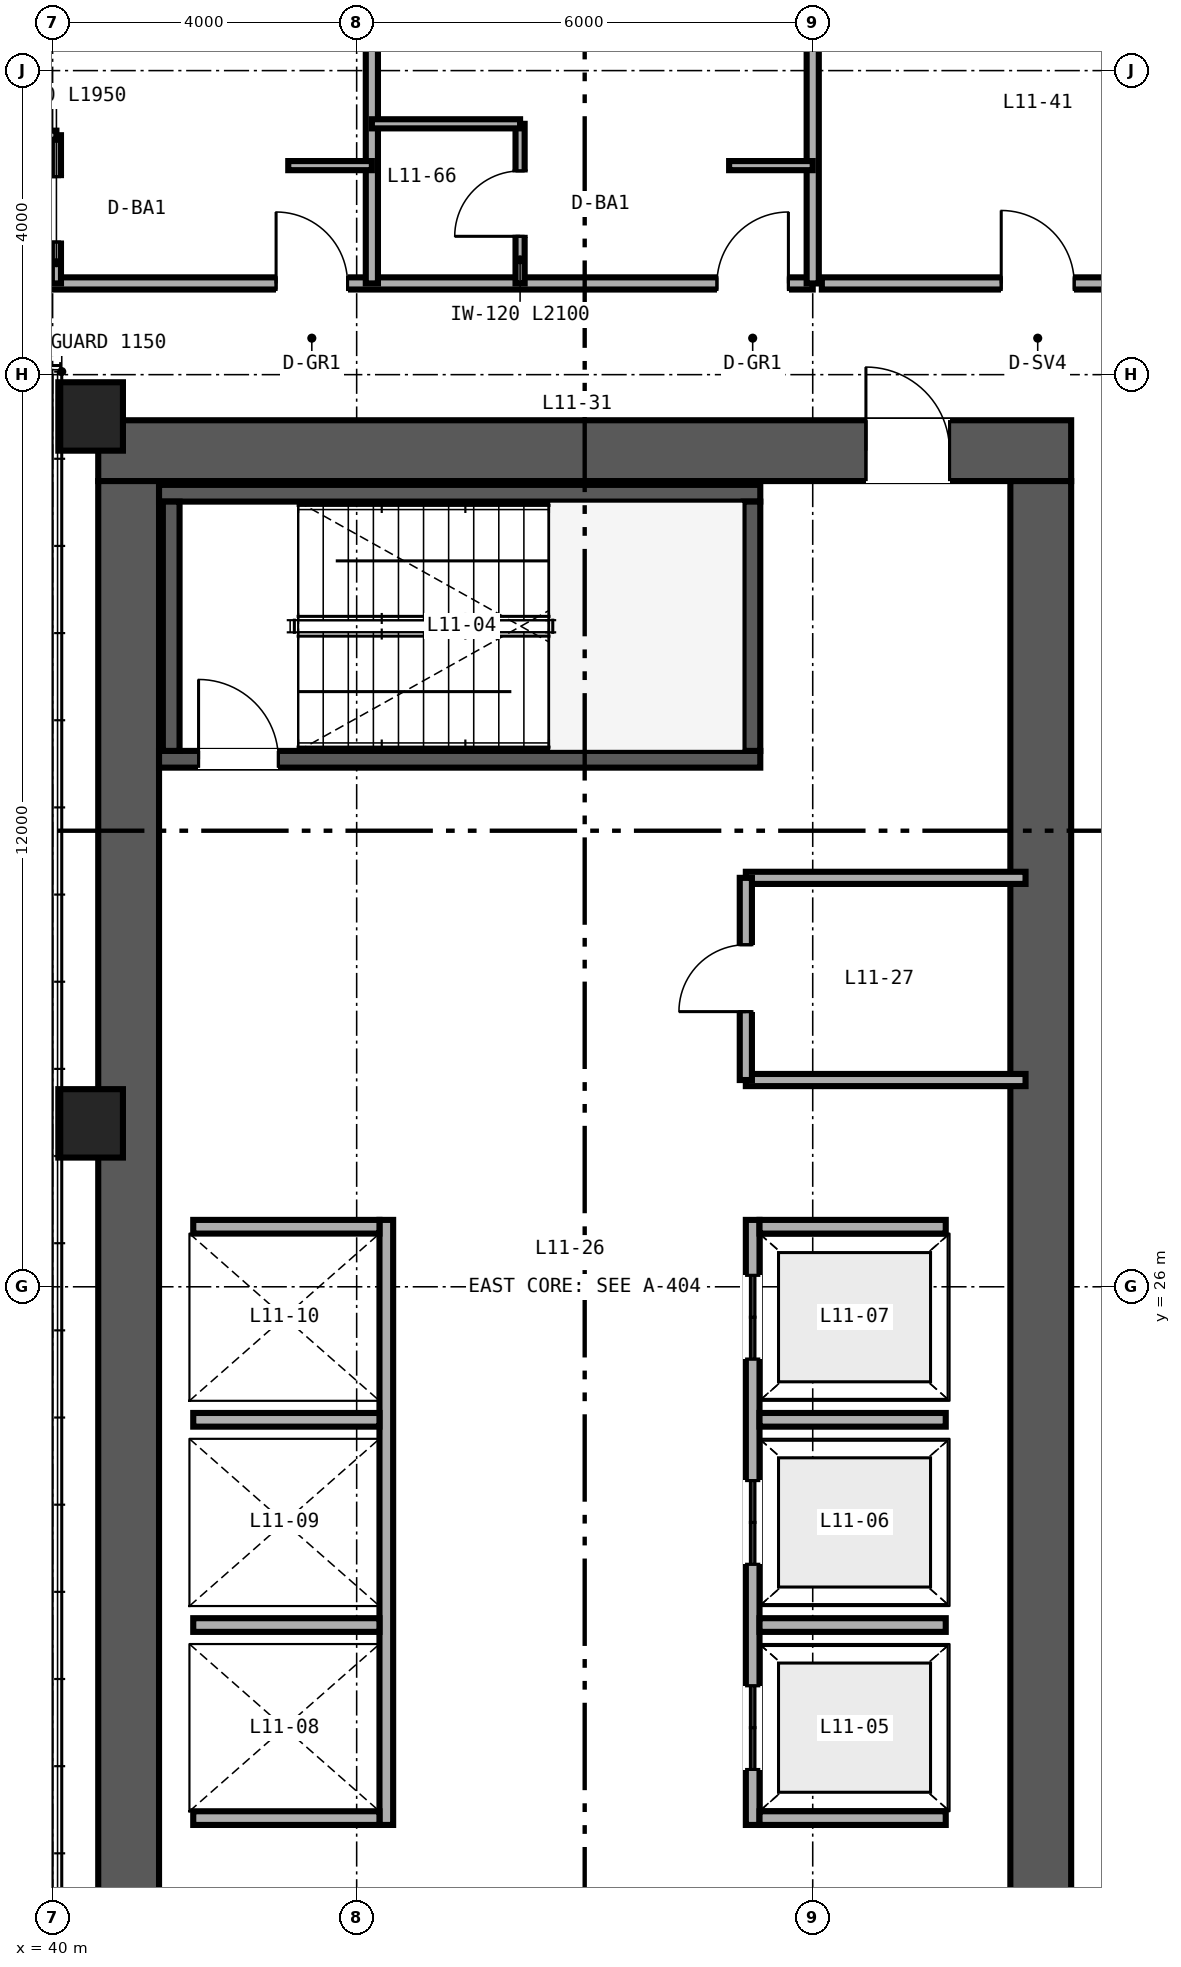
"""IFC4 building model, lengths in metres.
Left out: names, types, materials, properties, quantities, classifications, styles, units other than length and angle.
Written with IfcOpenShell. Run it as: python <this file> out.ifc"""

import sys

from ifc_helpers import new_model, si_unit, direction, frame, frame_2d, origin, origin_2d, place, context, subcontext, project, spatial, rectangle, hollow_rectangle, extrude, source, transform, mapped, element, fill, save


model = new_model("IFC4")
c1 = context("Model", 3, precision=1e-05, world=origin(), true_north=direction((0.0, 1.0)))
c2 = subcontext(c1, "Body", "Model", "MODEL_VIEW")
j1 = project(units=[si_unit("LENGTHUNIT", "METRE"), si_unit("PLANEANGLEUNIT", "RADIAN")], contexts=[c1])
p1 = place(None, origin())
s1 = spatial("IfcSite", under=j1, at=p1, CompositionType="ELEMENT")
p2 = place(p1, origin())
s2 = spatial("IfcBuilding", under=s1, at=p2, CompositionType="ELEMENT")
p3 = place(p2, frame((0.0, 0.0, 49.2)))
s3 = spatial("IfcBuildingStorey", under=s2, at=p3, CompositionType="ELEMENT", Elevation=49.2)
p4 = place(p3, frame((40.6, 37.0, 0.0), z_axis=(0.0, 0.0, 1.0), x_axis=(1.0, 0.0, 0.0)))
e1 = element("IfcWall", 1, at=p4, inside=s3, PredefinedType="SHEAR", context=c2, shape_type="SweptSolid", body=[
    extrude(rectangle(XDim=12.8, YDim=0.8, at=frame_2d((6.4, 0.0))), origin(), (0.0, 0.0, 1.0), 3.35),
])
p5 = place(p4, frame((10.1, 0.0, 0.0)))
e2 = element("IfcOpeningElement", 2, at=p5, cuts=e1, PredefinedType="OPENING", context=c2, shape_type="SweptSolid", body=[
    extrude(rectangle(XDim=1.1, YDim=2.15, at=frame_2d((0.55, 1.075))), frame((0.0, 0.41, 0.0), z_axis=(0.0, -1.0, 0.0), x_axis=(1.0, 0.0, 0.0)), (0.0, 0.0, 1.0), 0.82),
])
for number, where, z_axis, x_axis in (
    (3, (41.0, 15.4, 0.0), (0.0, 0.0, 1.0), (0.0, 1.0, 0.0)),
    (4, (53.0, 15.4, 0.0), (0.0, 0.0, 1.0), (0.0, 1.0, 0.0)),
):
    element("IfcWall", number, at=place(p3, frame(where, z_axis=z_axis, x_axis=x_axis)), inside=s3, PredefinedType="SHEAR", context=c2, shape_type="SweptSolid", body=[
        extrude(rectangle(XDim=21.2, YDim=0.8, at=frame_2d((10.6, 0.0))), origin(), (0.0, 0.0, 1.0), 3.35),
    ])
p6 = place(p3, frame((41.4, 32.94, 0.0), z_axis=(0.0, 0.0, 1.0), x_axis=(1.0, 0.0, 0.0)))
e5 = element("IfcWall", 5, at=p6, inside=s3, PredefinedType="SHEAR", context=c2, shape_type="SweptSolid", body=[
    extrude(rectangle(XDim=7.91, YDim=0.22, at=frame_2d((3.955, 0.0))), origin(), (0.0, 0.0, 1.0), 3.4),
])
p7 = place(p6, frame((0.52, 0.0, 0.0)))
e6 = element("IfcOpeningElement", 6, at=p7, cuts=e5, PredefinedType="OPENING", context=c2, shape_type="SweptSolid", body=[
    extrude(rectangle(XDim=1.05, YDim=2.15, at=frame_2d((0.525, 1.075))), frame((0.0, 0.12, 0.0), z_axis=(0.0, -1.0, 0.0), x_axis=(1.0, 0.0, 0.0)), (0.0, 0.0, 1.0), 0.24),
])
p8 = place(p3, frame((41.4, 36.44, 0.0), z_axis=(0.0, 0.0, 1.0), x_axis=(1.0, 0.0, 0.0)))
e7 = element("IfcWall", 7, at=p8, inside=s3, PredefinedType="SHEAR", context=c2, shape_type="SweptSolid", body=[
    extrude(rectangle(XDim=7.91, YDim=0.22, at=frame_2d((3.955, 0.0))), origin(), (0.0, 0.0, 1.0), 3.4),
])
for number, where, z_axis, x_axis in (
    (8, (41.56, 33.05, 0.0), (0.0, 0.0, 1.0), (0.0, 1.0, 0.0)),
    (9, (49.2, 33.05, 0.0), (0.0, 0.0, 1.0), (0.0, 1.0, 0.0)),
):
    element("IfcWall", number, at=place(p3, frame(where, z_axis=z_axis, x_axis=x_axis)), inside=s3, PredefinedType="SHEAR", context=c2, shape_type="SweptSolid", body=[
        extrude(rectangle(XDim=3.28, YDim=0.22, at=frame_2d((1.64, 0.0))), origin(), (0.0, 0.0, 1.0), 3.4),
    ])
m1 = source(origin(), c2, "Body", "SweptSolid", [
    extrude(hollow_rectangle(XDim=0.85, YDim=0.9, WallThickness=0.04, at=origin_2d()), origin(), (0.0, 0.0, 1.0), 3.35),
])
for number, where, z_axis, x_axis in (
    (10, (40.5, 28.15, 0.0), (0.0, 0.0, 1.0), (1.0, 0.0, 0.0)),
    (11, (40.5, 37.45, 0.0), (0.0, 0.0, 1.0), (1.0, 0.0, 0.0)),
):
    element("IfcColumn", number, at=place(p3, frame(where, z_axis=z_axis, x_axis=x_axis)), inside=s3, PredefinedType="COLUMN", context=c2, shape_type="MappedRepresentation", body=[
        mapped(m1, transform((0.0, 0.0, 0.0), scale=1.0)),
    ])
p9 = place(p3, frame((49.21, 18.92, 0.0), z_axis=(0.0, 0.0, 1.0), x_axis=(0.0, 1.0, 0.0)))
e12 = element("IfcWall", 12, at=p9, inside=s3, PredefinedType="SOLIDWALL", context=c2, shape_type="SweptSolid", body=[
    extrude(rectangle(XDim=7.96, YDim=0.18, at=frame_2d((3.98, 0.0))), origin(), (0.0, 0.0, 1.0), 3.35),
])
p10 = place(p9, frame((0.73, 0.0, 0.0)))
e13 = element("IfcOpeningElement", 13, at=p10, cuts=e12, PredefinedType="OPENING", context=c2, shape_type="SweptSolid", body=[
    extrude(rectangle(XDim=1.1, YDim=2.2, at=frame_2d((0.55, 1.1))), frame((0.0, 0.1, 0.0), z_axis=(0.0, -1.0, 0.0), x_axis=(1.0, 0.0, 0.0)), (0.0, 0.0, 1.0), 0.2),
])
p11 = place(p9, frame((3.43, 0.0, 0.0)))
e14 = element("IfcOpeningElement", 14, at=p11, cuts=e12, PredefinedType="OPENING", context=c2, shape_type="SweptSolid", body=[
    extrude(rectangle(XDim=1.1, YDim=2.2, at=frame_2d((0.55, 1.1))), frame((0.0, 0.1, 0.0), z_axis=(0.0, -1.0, 0.0), x_axis=(1.0, 0.0, 0.0)), (0.0, 0.0, 1.0), 0.2),
])
p12 = place(p9, frame((6.13, 0.0, 0.0)))
e15 = element("IfcOpeningElement", 15, at=p12, cuts=e12, PredefinedType="OPENING", context=c2, shape_type="SweptSolid", body=[
    extrude(rectangle(XDim=1.1, YDim=2.2, at=frame_2d((0.55, 1.1))), frame((0.0, 0.1, 0.0), z_axis=(0.0, -1.0, 0.0), x_axis=(1.0, 0.0, 0.0)), (0.0, 0.0, 1.0), 0.2),
])
for number, where, z_axis, x_axis in (
    (16, (49.3, 19.01, 0.0), (0.0, 0.0, 1.0), (1.0, 0.0, 0.0)),
    (17, (49.3, 26.79, 0.0), (0.0, 0.0, 1.0), (1.0, 0.0, 0.0)),
    (18, (49.3, 21.55, 0.0), (0.0, 0.0, 1.0), (1.0, 0.0, 0.0)),
    (19, (49.3, 24.25, 0.0), (0.0, 0.0, 1.0), (1.0, 0.0, 0.0)),
):
    element("IfcWall", number, at=place(p3, frame(where, z_axis=z_axis, x_axis=x_axis)), inside=s3, PredefinedType="SOLIDWALL", context=c2, shape_type="SweptSolid", body=[
        extrude(rectangle(XDim=2.45, YDim=0.18, at=frame_2d((1.225, 0.0))), origin(), (0.0, 0.0, 1.0), 3.35),
    ])
p13 = place(p3, frame((44.39, 18.92, 0.0), z_axis=(0.0, 0.0, 1.0), x_axis=(0.0, 1.0, 0.0)))
e20 = element("IfcWall", 20, at=p13, inside=s3, PredefinedType="SOLIDWALL", context=c2, shape_type="SweptSolid", body=[
    extrude(rectangle(XDim=7.96, YDim=0.18, at=frame_2d((3.98, 0.0))), origin(), (0.0, 0.0, 1.0), 3.35),
])
for number, where, z_axis, x_axis in (
    (21, (41.85, 19.01, 0.0), (0.0, 0.0, 1.0), (1.0, 0.0, 0.0)),
    (22, (41.85, 26.79, 0.0), (0.0, 0.0, 1.0), (1.0, 0.0, 0.0)),
    (23, (41.85, 21.55, 0.0), (0.0, 0.0, 1.0), (1.0, 0.0, 0.0)),
    (24, (41.85, 24.25, 0.0), (0.0, 0.0, 1.0), (1.0, 0.0, 0.0)),
):
    element("IfcWall", number, at=place(p3, frame(where, z_axis=z_axis, x_axis=x_axis)), inside=s3, PredefinedType="SOLIDWALL", context=c2, shape_type="SweptSolid", body=[
        extrude(rectangle(XDim=2.45, YDim=0.18, at=frame_2d((1.225, 0.0))), origin(), (0.0, 0.0, 1.0), 3.35),
    ])
p14 = place(p3, frame((49.12, 28.72, 0.0), z_axis=(0.0, 0.0, 1.0), x_axis=(1.0, 0.0, 0.0)))
e25 = element("IfcWall", 25, at=p14, inside=s3, PredefinedType="PARTITIONING", context=c2, shape_type="SweptSolid", body=[
    extrude(rectangle(XDim=3.68, YDim=0.16, at=frame_2d((1.84, 0.0))), origin(), (0.0, 0.0, 1.0), 3.35),
])
p15 = place(p3, frame((49.12, 31.38, 0.0), z_axis=(0.0, 0.0, 1.0), x_axis=(1.0, 0.0, 0.0)))
e26 = element("IfcWall", 26, at=p15, inside=s3, PredefinedType="PARTITIONING", context=c2, shape_type="SweptSolid", body=[
    extrude(rectangle(XDim=3.68, YDim=0.16, at=frame_2d((1.84, 0.0))), origin(), (0.0, 0.0, 1.0), 2.36),
])
p16 = place(p3, frame((49.12, 28.72, 0.0), z_axis=(0.0, 0.0, 1.0), x_axis=(0.0, 1.0, 0.0)))
e27 = element("IfcWall", 27, at=p16, inside=s3, PredefinedType="PARTITIONING", context=c2, shape_type="SweptSolid", body=[
    extrude(rectangle(XDim=2.66, YDim=0.16, at=frame_2d((1.33, 0.0))), origin(), (0.0, 0.0, 1.0), 2.36),
])
p17 = place(p16, frame((0.9, 0.0, 0.0)))
e28 = element("IfcOpeningElement", 28, at=p17, cuts=e27, PredefinedType="OPENING", context=c2, shape_type="SweptSolid", body=[
    extrude(rectangle(XDim=0.88, YDim=2.15, at=frame_2d((0.44, 1.075))), frame((0.0, 0.09, 0.0), z_axis=(0.0, -1.0, 0.0), x_axis=(1.0, 0.0, 0.0)), (0.0, 0.0, 1.0), 0.18),
])
p18 = place(p3, frame((50.12, 39.2, 0.0), z_axis=(0.0, 0.0, 1.0), x_axis=(1.0, 0.0, 0.0)))
e29 = element("IfcWall", 29, at=p18, inside=s3, PredefinedType="PARTITIONING", context=c2, shape_type="SweptSolid", body=[
    extrude(rectangle(XDim=5.68, YDim=0.16, at=frame_2d((2.84, 0.0))), origin(), (0.0, 0.0, 1.0), 3.35),
])
p19 = place(p18, frame((2.36, 0.0, 0.0)))
e30 = element("IfcOpeningElement", 30, at=p19, cuts=e29, PredefinedType="OPENING", context=c2, shape_type="SweptSolid", body=[
    extrude(rectangle(XDim=0.96, YDim=2.15, at=frame_2d((0.48, 1.075))), frame((0.0, 0.09, 0.0), z_axis=(0.0, -1.0, 0.0), x_axis=(1.0, 0.0, 0.0)), (0.0, 0.0, 1.0), 0.18),
])
p20 = place(p3, frame((14.0, 39.2, 0.0), z_axis=(0.0, 0.0, 1.0), x_axis=(1.0, 0.0, 0.0)))
e31 = element("IfcWall", 31, at=p20, inside=s3, PredefinedType="PARTITIONING", context=c2, shape_type="SweptSolid", body=[
    extrude(rectangle(XDim=36.0, YDim=0.16, at=frame_2d((18.0, 0.0))), origin(), (0.0, 0.0, 1.0), 2.571),
])
p21 = place(p20, frame((4.54, 0.0, 0.0)))
e32 = element("IfcOpeningElement", 32, at=p21, cuts=e31, PredefinedType="OPENING", context=c2, shape_type="SweptSolid", body=[
    extrude(rectangle(XDim=0.94, YDim=2.15, at=frame_2d((0.47, 1.075))), frame((0.0, 0.09, 0.0), z_axis=(0.0, -1.0, 0.0), x_axis=(1.0, 0.0, 0.0)), (0.0, 0.0, 1.0), 0.18),
])
p22 = place(p20, frame((10.29, 0.0, 0.0)))
e33 = element("IfcOpeningElement", 33, at=p22, cuts=e31, PredefinedType="OPENING", context=c2, shape_type="SweptSolid", body=[
    extrude(rectangle(XDim=0.94, YDim=2.15, at=frame_2d((0.47, 1.075))), frame((0.0, 0.09, 0.0), z_axis=(0.0, -1.0, 0.0), x_axis=(1.0, 0.0, 0.0)), (0.0, 0.0, 1.0), 0.18),
])
p23 = place(p20, frame((16.54, 0.0, 0.0)))
e34 = element("IfcOpeningElement", 34, at=p23, cuts=e31, PredefinedType="OPENING", context=c2, shape_type="SweptSolid", body=[
    extrude(rectangle(XDim=0.94, YDim=2.15, at=frame_2d((0.47, 1.075))), frame((0.0, 0.09, 0.0), z_axis=(0.0, -1.0, 0.0), x_axis=(1.0, 0.0, 0.0)), (0.0, 0.0, 1.0), 0.18),
])
p24 = place(p20, frame((20.62, 0.0, 0.0)))
e35 = element("IfcOpeningElement", 35, at=p24, cuts=e31, PredefinedType="OPENING", context=c2, shape_type="SweptSolid", body=[
    extrude(rectangle(XDim=0.96, YDim=2.15, at=frame_2d((0.48, 1.075))), frame((0.0, 0.09, 0.0), z_axis=(0.0, -1.0, 0.0), x_axis=(1.0, 0.0, 0.0)), (0.0, 0.0, 1.0), 0.18),
])
p25 = place(p20, frame((28.94, 0.0, 0.0)))
e36 = element("IfcOpeningElement", 36, at=p25, cuts=e31, PredefinedType="OPENING", context=c2, shape_type="SweptSolid", body=[
    extrude(rectangle(XDim=0.94, YDim=2.15, at=frame_2d((0.47, 1.075))), frame((0.0, 0.09, 0.0), z_axis=(0.0, -1.0, 0.0), x_axis=(1.0, 0.0, 0.0)), (0.0, 0.0, 1.0), 0.18),
])
p26 = place(p20, frame((34.74, 0.0, 0.0)))
e37 = element("IfcOpeningElement", 37, at=p26, cuts=e31, PredefinedType="OPENING", context=c2, shape_type="SweptSolid", body=[
    extrude(rectangle(XDim=0.94, YDim=2.15, at=frame_2d((0.47, 1.075))), frame((0.0, 0.09, 0.0), z_axis=(0.0, -1.0, 0.0), x_axis=(1.0, 0.0, 0.0)), (0.0, 0.0, 1.0), 0.18),
])
for number, where, z_axis, x_axis in (
    (38, (50.0, 39.2, 0.0), (0.0, 0.0, 1.0), (0.0, 1.0, 0.0)),
    (39, (44.2, 39.2, 0.0), (0.0, 0.0, 1.0), (0.0, 1.0, 0.0)),
):
    element("IfcWall", number, at=place(p3, frame(where, z_axis=z_axis, x_axis=x_axis)), inside=s3, PredefinedType="PARTITIONING", context=c2, shape_type="SweptSolid", body=[
        extrude(rectangle(XDim=10.44, YDim=0.16, at=frame_2d((5.22, 0.0))), origin(), (0.0, 0.0, 1.0), 2.657),
    ])
p27 = place(p3, frame((40.05, 39.2, 0.0), z_axis=(0.0, 0.0, 1.0), x_axis=(0.0, 1.0, 0.0)))
e40 = element("IfcWall", 40, at=p27, inside=s3, PredefinedType="PARTITIONING", context=c2, shape_type="SweptSolid", body=[
    extrude(rectangle(XDim=1.95, YDim=0.12, at=frame_2d((0.975, 0.0))), origin(), (0.0, 0.0, 1.0), 3.35),
])
p28 = place(p27, frame((0.545, 0.0, 0.0)))
e41 = element("IfcOpeningElement", 41, at=p28, cuts=e40, PredefinedType="OPENING", context=c2, shape_type="SweptSolid", body=[
    extrude(rectangle(XDim=0.86, YDim=2.1, at=frame_2d((0.43, 1.05))), frame((0.0, 0.07, 0.0), z_axis=(0.0, -1.0, 0.0), x_axis=(1.0, 0.0, 0.0)), (0.0, 0.0, 1.0), 0.14),
])
p29 = place(p3, frame((38.4, 41.15, 0.0), z_axis=(0.0, 0.0, 1.0), x_axis=(1.0, 0.0, 0.0)))
e42 = element("IfcWall", 42, at=p29, inside=s3, PredefinedType="PARTITIONING", context=c2, shape_type="SweptSolid", body=[
    extrude(rectangle(XDim=1.65, YDim=0.12, at=frame_2d((0.825, 0.0))), origin(), (0.0, 0.0, 1.0), 3.35),
])
p30 = place(p3, frame((43.1, 40.75, 0.0), z_axis=(0.0, 0.0, 1.0), x_axis=(1.0, 0.0, 0.0)))
e43 = element("IfcWall", 43, at=p30, inside=s3, PredefinedType="PARTITIONING", context=c2, shape_type="SweptSolid", body=[
    extrude(rectangle(XDim=1.1, YDim=0.12, at=frame_2d((0.55, 0.0))), origin(), (0.0, 0.0, 1.0), 3.35),
])
p31 = place(p3, frame((46.15, 39.2, 0.0), z_axis=(0.0, 0.0, 1.0), x_axis=(0.0, 1.0, 0.0)))
e44 = element("IfcWall", 44, at=p31, inside=s3, PredefinedType="PARTITIONING", context=c2, shape_type="SweptSolid", body=[
    extrude(rectangle(XDim=2.1, YDim=0.12, at=frame_2d((1.05, 0.0))), origin(), (0.0, 0.0, 1.0), 3.35),
])
p32 = place(p31, frame((0.62, 0.0, 0.0)))
e45 = element("IfcOpeningElement", 45, at=p32, cuts=e44, PredefinedType="OPENING", context=c2, shape_type="SweptSolid", body=[
    extrude(rectangle(XDim=0.86, YDim=2.1, at=frame_2d((0.43, 1.05))), frame((0.0, 0.07, 0.0), z_axis=(0.0, -1.0, 0.0), x_axis=(1.0, 0.0, 0.0)), (0.0, 0.0, 1.0), 0.14),
])
p33 = place(p3, frame((44.2, 41.3, 0.0), z_axis=(0.0, 0.0, 1.0), x_axis=(1.0, 0.0, 0.0)))
e46 = element("IfcWall", 46, at=p33, inside=s3, PredefinedType="PARTITIONING", context=c2, shape_type="SweptSolid", body=[
    extrude(rectangle(XDim=1.95, YDim=0.12, at=frame_2d((0.975, 0.0))), origin(), (0.0, 0.0, 1.0), 3.35),
])
p34 = place(p3, frame((48.9, 40.75, 0.0), z_axis=(0.0, 0.0, 1.0), x_axis=(1.0, 0.0, 0.0)))
e47 = element("IfcWall", 47, at=p34, inside=s3, PredefinedType="PARTITIONING", context=c2, shape_type="SweptSolid", body=[
    extrude(rectangle(XDim=1.1, YDim=0.12, at=frame_2d((0.55, 0.0))), origin(), (0.0, 0.0, 1.0), 3.35),
])
m2 = source(origin(), c2, "Body", "SweptSolid", [
    extrude(rectangle(XDim=1.05, YDim=2.15, at=frame_2d((0.525, 1.075))), frame((0.0, 0.025, 0.0), z_axis=(0.0, -1.0, 0.0), x_axis=(1.0, 0.0, 0.0)), (0.0, 0.0, 1.0), 0.05),
])
p35 = place(p7, origin())
e48 = element("IfcDoor", 48, at=p35, inside=s3, OperationType="SINGLE_SWING_LEFT", PredefinedType="DOOR", context=c2, shape_type="MappedRepresentation", body=[
    mapped(m2, transform((0.0, 0.0, 0.0), scale=1.0)),
])
fill(e6, e48)
m3 = source(origin(), c2, "Body", "SweptSolid", [
    extrude(rectangle(XDim=1.1, YDim=2.2, at=frame_2d((0.55, 1.1))), frame((0.0, 0.025, 0.0), z_axis=(0.0, -1.0, 0.0), x_axis=(1.0, 0.0, 0.0)), (0.0, 0.0, 1.0), 0.05),
])
p36 = place(p10, origin())
e49 = element("IfcDoor", 49, at=p36, inside=s3, OperationType="DOUBLE_DOOR_SLIDING", PredefinedType="DOOR", context=c2, shape_type="MappedRepresentation", body=[
    mapped(m3, transform((0.0, 0.0, 0.0), scale=1.0)),
])
fill(e13, e49)
p37 = place(p11, origin())
e50 = element("IfcDoor", 50, at=p37, inside=s3, OperationType="DOUBLE_DOOR_SLIDING", PredefinedType="DOOR", context=c2, shape_type="MappedRepresentation", body=[
    mapped(m3, transform((0.0, 0.0, 0.0), scale=1.0)),
])
fill(e14, e50)
p38 = place(p12, origin())
e51 = element("IfcDoor", 51, at=p38, inside=s3, OperationType="DOUBLE_DOOR_SLIDING", PredefinedType="DOOR", context=c2, shape_type="MappedRepresentation", body=[
    mapped(m3, transform((0.0, 0.0, 0.0), scale=1.0)),
])
fill(e15, e51)
m4 = source(origin(), c2, "Body", "SweptSolid", [
    extrude(rectangle(XDim=1.1, YDim=2.15, at=frame_2d((0.55, 1.075))), frame((0.0, 0.025, 0.0), z_axis=(0.0, -1.0, 0.0), x_axis=(1.0, 0.0, 0.0)), (0.0, 0.0, 1.0), 0.05),
])
p39 = place(p5, origin())
e52 = element("IfcDoor", 52, at=p39, inside=s3, OperationType="SINGLE_SWING_LEFT", PredefinedType="DOOR", context=c2, shape_type="MappedRepresentation", body=[
    mapped(m4, transform((0.0, 0.0, 0.0), scale=1.0)),
])
fill(e2, e52)
m5 = source(origin(), c2, "Body", "SweptSolid", [
    extrude(rectangle(XDim=0.88, YDim=2.15, at=frame_2d((0.44, 1.075))), frame((0.0, 0.025, 0.0), z_axis=(0.0, -1.0, 0.0), x_axis=(1.0, 0.0, 0.0)), (0.0, 0.0, 1.0), 0.05),
])
p40 = place(p17, origin())
e53 = element("IfcDoor", 53, at=p40, inside=s3, OperationType="SINGLE_SWING_LEFT", PredefinedType="DOOR", context=c2, shape_type="MappedRepresentation", body=[
    mapped(m5, transform((0.0, 0.0, 0.0), scale=1.0)),
])
fill(e28, e53)
m6 = source(origin(), c2, "Body", "SweptSolid", [
    extrude(rectangle(XDim=0.96, YDim=2.15, at=frame_2d((0.48, 1.075))), frame((0.0, 0.025, 0.0), z_axis=(0.0, -1.0, 0.0), x_axis=(1.0, 0.0, 0.0)), (0.0, 0.0, 1.0), 0.05),
])
p41 = place(p19, origin())
e54 = element("IfcDoor", 54, at=p41, inside=s3, OperationType="SINGLE_SWING_LEFT", PredefinedType="DOOR", context=c2, shape_type="MappedRepresentation", body=[
    mapped(m6, transform((0.0, 0.0, 0.0), scale=1.0)),
])
fill(e30, e54)
m7 = source(origin(), c2, "Body", "SweptSolid", [
    extrude(rectangle(XDim=0.86, YDim=2.1, at=frame_2d((0.43, 1.05))), frame((0.0, 0.025, 0.0), z_axis=(0.0, -1.0, 0.0), x_axis=(1.0, 0.0, 0.0)), (0.0, 0.0, 1.0), 0.05),
])
p42 = place(p28, origin())
e55 = element("IfcDoor", 55, at=p42, inside=s3, OperationType="SINGLE_SWING_RIGHT", PredefinedType="DOOR", context=c2, shape_type="MappedRepresentation", body=[
    mapped(m7, transform((0.0, 0.0, 0.0), scale=1.0)),
])
fill(e41, e55)
p43 = place(p32, origin())
e56 = element("IfcDoor", 56, at=p43, inside=s3, OperationType="SINGLE_SWING_LEFT", PredefinedType="DOOR", context=c2, shape_type="MappedRepresentation", body=[
    mapped(m7, transform((0.0, 0.0, 0.0), scale=1.0)),
])
fill(e45, e56)
m8 = source(origin(), c2, "Body", "SweptSolid", [
    extrude(rectangle(XDim=0.94, YDim=2.15, at=frame_2d((0.47, 1.075))), frame((0.0, 0.025, 0.0), z_axis=(0.0, -1.0, 0.0), x_axis=(1.0, 0.0, 0.0)), (0.0, 0.0, 1.0), 0.05),
])
p44 = place(p25, origin())
e57 = element("IfcDoor", 57, at=p44, inside=s3, OperationType="SINGLE_SWING_LEFT", PredefinedType="DOOR", context=c2, shape_type="MappedRepresentation", body=[
    mapped(m8, transform((0.0, 0.0, 0.0), scale=1.0)),
])
fill(e36, e57)
p45 = place(p26, origin())
e58 = element("IfcDoor", 58, at=p45, inside=s3, OperationType="SINGLE_SWING_RIGHT", PredefinedType="DOOR", context=c2, shape_type="MappedRepresentation", body=[
    mapped(m8, transform((0.0, 0.0, 0.0), scale=1.0)),
])
fill(e37, e58)
save(model, sys.argv[1])
